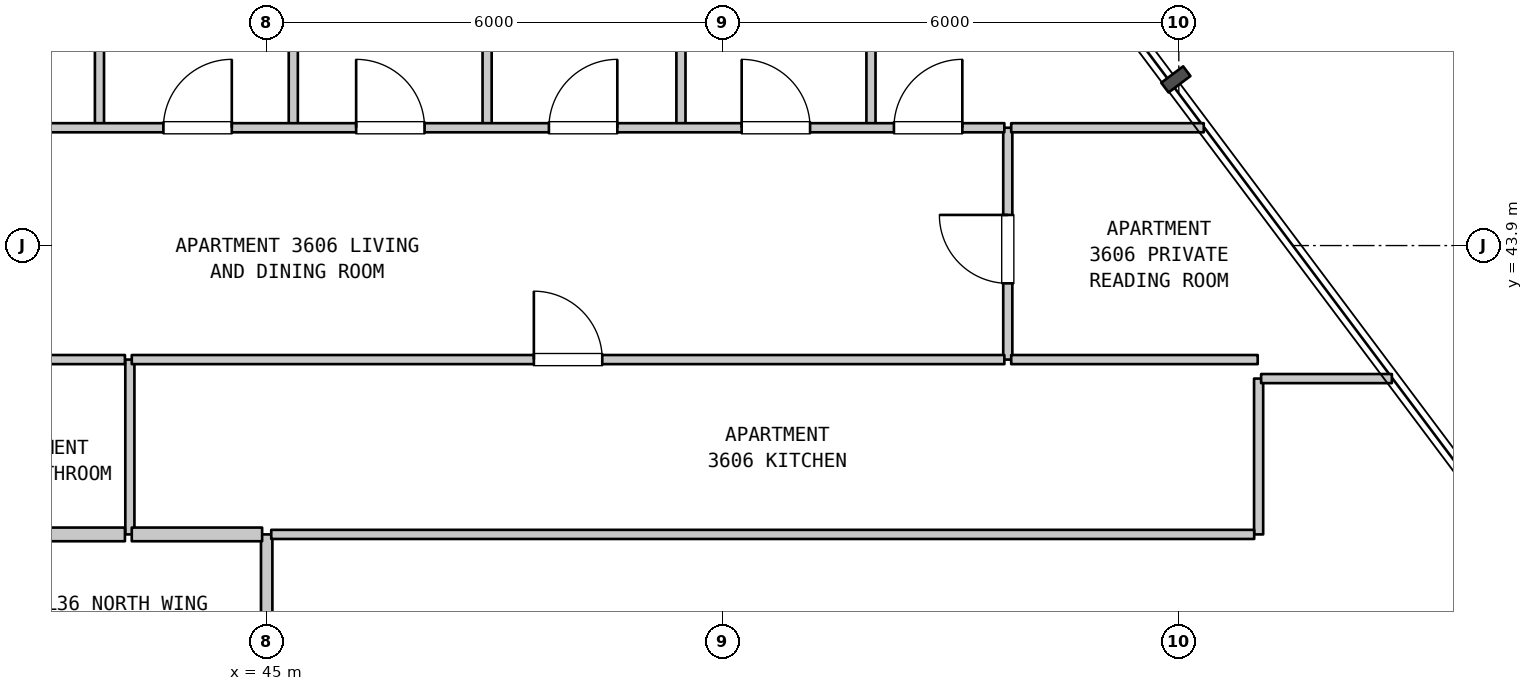
"""IFC4 building model, lengths in metres.
Left out: names, types, materials, properties, quantities, classifications, styles, units other than length and angle.
Written with IfcOpenShell. Run it as: python <this file> out.ifc"""

import sys

from ifc_helpers import new_model, si_unit, direction, frame, frame_2d, origin, place, context, subcontext, project, spatial, rectangle, extrude, element, fill, save


model = new_model("IFC4")
c1 = context("Model", 3, precision=1e-05, world=origin(), true_north=direction((0.0, 1.0)))
c2 = subcontext(c1, "Body", "Model", "MODEL_VIEW")
j1 = project(units=[si_unit("LENGTHUNIT", "METRE"), si_unit("PLANEANGLEUNIT", "RADIAN")], contexts=[c1])
p1 = place(None, origin())
s1 = spatial("IfcSite", under=j1, at=p1, CompositionType="ELEMENT")
p2 = place(p1, origin())
s2 = spatial("IfcBuilding", under=s1, at=p2, CompositionType="ELEMENT")
p3 = place(p2, frame((0.0, 0.0, 148.3)))
s3 = spatial("IfcBuildingStorey", under=s2, at=p3, CompositionType="ELEMENT", Elevation=148.3)
p4 = place(p3, frame((42.8, 45.45, 0.0), z_axis=(0.0, 0.0, 1.0), x_axis=(0.0, 1.0, 0.0)))
e1 = element("IfcWall", 1, at=p4, inside=s3, PredefinedType="PARTITIONING", context=c2, shape_type="SweptSolid", body=[
    extrude(rectangle(XDim=8.44, YDim=0.12, at=frame_2d((4.22, 0.0))), origin(), (0.0, 0.0, 1.0), 3.385),
])
p5 = place(p3, frame((43.2, 40.1, 0.0), z_axis=(0.0, 0.0, 1.0), x_axis=(0.0, 1.0, 0.0)))
e2 = element("IfcWall", 2, at=p5, inside=s3, PredefinedType="PARTITIONING", context=c2, shape_type="SweptSolid", body=[
    extrude(rectangle(XDim=2.3, YDim=0.12, at=frame_2d((1.15, 0.0))), origin(), (0.0, 0.0, 1.0), 3.385),
])
p6 = place(p3, frame((45.0, 37.9, 0.0), z_axis=(0.0, 0.0, 1.0), x_axis=(0.0, 1.0, 0.0)))
e3 = element("IfcWall", 3, at=p6, inside=s3, PredefinedType="STANDARD", context=c2, shape_type="SweptSolid", body=[
    extrude(rectangle(XDim=2.2, YDim=0.15, at=frame_2d((1.1, 0.0))), origin(), (0.0, 0.0, 1.0), 3.385),
])
for number, where, z_axis, x_axis in (
    (4, (45.35, 45.45, 0.0), (0.0, 0.0, 1.0), (0.0, 1.0, 0.0)),
    (5, (47.9, 45.45, 0.0), (0.0, 0.0, 1.0), (0.0, 1.0, 0.0)),
):
    element("IfcWall", number, at=place(p3, frame(where, z_axis=z_axis, x_axis=x_axis)), inside=s3, PredefinedType="PARTITIONING", context=c2, shape_type="SweptSolid", body=[
        extrude(rectangle(XDim=8.44, YDim=0.12, at=frame_2d((4.22, 0.0))), origin(), (0.0, 0.0, 1.0), 3.385),
    ])
p7 = place(p3, frame((50.45, 45.45, 0.0), z_axis=(0.0, 0.0, 1.0), x_axis=(0.0, 1.0, 0.0)))
e6 = element("IfcWall", 6, at=p7, inside=s3, PredefinedType="PARTITIONING", context=c2, shape_type="SweptSolid", body=[
    extrude(rectangle(XDim=8.215, YDim=0.12, at=frame_2d((4.107, 0.0))), origin(), (0.0, 0.0, 1.0), 3.385),
])
p8 = place(p3, frame((52.95, 45.45, 0.0), z_axis=(0.0, 0.0, 1.0), x_axis=(0.0, 1.0, 0.0)))
e7 = element("IfcWall", 7, at=p8, inside=s3, PredefinedType="PARTITIONING", context=c2, shape_type="SweptSolid", body=[
    extrude(rectangle(XDim=5.84, YDim=0.12, at=frame_2d((2.92, 0.0))), origin(), (0.0, 0.0, 1.0), 3.385),
])
p9 = place(p3, frame((54.75, 42.4, 0.0), z_axis=(0.0, 0.0, 1.0), x_axis=(0.0, 1.0, 0.0)))
e8 = element("IfcWall", 8, at=p9, inside=s3, PredefinedType="PARTITIONING", context=c2, shape_type="SweptSolid", body=[
    extrude(rectangle(XDim=3.05, YDim=0.12, at=frame_2d((1.525, 0.0))), origin(), (0.0, 0.0, 1.0), 3.385),
])
p10 = place(p9, frame((1.003, 0.0, 0.0)))
e9 = element("IfcOpeningElement", 9, at=p10, cuts=e8, PredefinedType="OPENING", context=c2, shape_type="SweptSolid", body=[
    extrude(rectangle(XDim=0.9, YDim=2.15, at=frame_2d((0.45, 1.075))), frame((0.0, 0.07, 0.0), z_axis=(0.0, -1.0, 0.0), x_axis=(1.0, 0.0, 0.0)), (0.0, 0.0, 1.0), 0.14),
])
p11 = place(p3, frame((58.05, 40.1, 0.0), z_axis=(0.0, 0.0, 1.0), x_axis=(0.0, 1.0, 0.0)))
e10 = element("IfcWall", 10, at=p11, inside=s3, PredefinedType="PARTITIONING", context=c2, shape_type="SweptSolid", body=[
    extrude(rectangle(XDim=2.05, YDim=0.12, at=frame_2d((1.025, 0.0))), origin(), (0.0, 0.0, 1.0), 3.385),
])
p12 = place(p3, frame((38.99, 40.1, 0.0), z_axis=(0.0, 0.0, 1.0), x_axis=(1.0, 0.0, 0.0)))
e11 = element("IfcWall", 11, at=p12, inside=s3, PredefinedType="STANDARD", context=c2, shape_type="SweptSolid", body=[
    extrude(rectangle(XDim=4.145, YDim=0.18, at=frame_2d((2.073, 0.0))), origin(), (0.0, 0.0, 1.0), 3.385),
])
p13 = place(p3, frame((43.225, 40.1, 0.0), z_axis=(0.0, 0.0, 1.0), x_axis=(1.0, 0.0, 0.0)))
e12 = element("IfcWall", 12, at=p13, inside=s3, PredefinedType="STANDARD", context=c2, shape_type="SweptSolid", body=[
    extrude(rectangle(XDim=1.715, YDim=0.18, at=frame_2d((0.857, 0.0))), origin(), (0.0, 0.0, 1.0), 3.385),
])
p14 = place(p3, frame((45.06, 40.1, 0.0), z_axis=(0.0, 0.0, 1.0), x_axis=(1.0, 0.0, 0.0)))
e13 = element("IfcWall", 13, at=p14, inside=s3, PredefinedType="PARTITIONING", context=c2, shape_type="SweptSolid", body=[
    extrude(rectangle(XDim=12.932, YDim=0.12, at=frame_2d((6.466, 0.0))), origin(), (0.0, 0.0, 1.0), 3.385),
])
p15 = place(p3, frame((58.083, 42.15, 0.0), z_axis=(0.0, 0.0, 1.0), x_axis=(1.0, 0.0, 0.0)))
e14 = element("IfcWall", 14, at=p15, inside=s3, PredefinedType="PARTITIONING", context=c2, shape_type="SweptSolid", body=[
    extrude(rectangle(XDim=1.72, YDim=0.12, at=frame_2d((0.86, 0.0))), origin(), (0.0, 0.0, 1.0), 3.385),
])
p16 = place(p3, frame((38.99, 42.4, 0.0), z_axis=(0.0, 0.0, 1.0), x_axis=(1.0, 0.0, 0.0)))
e15 = element("IfcWall", 15, at=p16, inside=s3, PredefinedType="PARTITIONING", context=c2, shape_type="SweptSolid", body=[
    extrude(rectangle(XDim=4.145, YDim=0.12, at=frame_2d((2.073, 0.0))), origin(), (0.0, 0.0, 1.0), 3.385),
])
p17 = place(p16, frame((1.59, 0.0, 0.0)))
e16 = element("IfcOpeningElement", 16, at=p17, cuts=e15, PredefinedType="OPENING", context=c2, shape_type="SweptSolid", body=[
    extrude(rectangle(XDim=0.9, YDim=2.1, at=frame_2d((0.45, 1.05))), frame((0.0, 0.07, 0.0), z_axis=(0.0, -1.0, 0.0), x_axis=(1.0, 0.0, 0.0)), (0.0, 0.0, 1.0), 0.14),
])
p18 = place(p3, frame((43.225, 42.4, 0.0), z_axis=(0.0, 0.0, 1.0), x_axis=(1.0, 0.0, 0.0)))
e17 = element("IfcWall", 17, at=p18, inside=s3, PredefinedType="PARTITIONING", context=c2, shape_type="SweptSolid", body=[
    extrude(rectangle(XDim=11.48, YDim=0.12, at=frame_2d((5.74, 0.0))), origin(), (0.0, 0.0, 1.0), 3.385),
])
p19 = place(p18, frame((5.29, 0.0, 0.0)))
e18 = element("IfcOpeningElement", 18, at=p19, cuts=e17, PredefinedType="OPENING", context=c2, shape_type="SweptSolid", body=[
    extrude(rectangle(XDim=0.9, YDim=2.15, at=frame_2d((0.45, 1.075))), frame((0.0, 0.07, 0.0), z_axis=(0.0, -1.0, 0.0), x_axis=(1.0, 0.0, 0.0)), (0.0, 0.0, 1.0), 0.14),
])
p20 = place(p3, frame((54.795, 42.4, 0.0), z_axis=(0.0, 0.0, 1.0), x_axis=(1.0, 0.0, 0.0)))
e19 = element("IfcWall", 19, at=p20, inside=s3, PredefinedType="PARTITIONING", context=c2, shape_type="SweptSolid", body=[
    extrude(rectangle(XDim=3.243, YDim=0.12, at=frame_2d((1.622, 0.0))), origin(), (0.0, 0.0, 1.0), 3.385),
])
p21 = place(p3, frame((32.725, 45.45, 0.0), z_axis=(0.0, 0.0, 1.0), x_axis=(1.0, 0.0, 0.0)))
e20 = element("IfcWall", 20, at=p21, inside=s3, PredefinedType="PARTITIONING", context=c2, shape_type="SweptSolid", body=[
    extrude(rectangle(XDim=21.98, YDim=0.12, at=frame_2d((10.99, 0.0))), origin(), (0.0, 0.0, 1.0), 3.385),
])
p22 = place(p21, frame((0.872, 0.0, 0.0)))
e21 = element("IfcOpeningElement", 21, at=p22, cuts=e20, PredefinedType="OPENING", context=c2, shape_type="SweptSolid", body=[
    extrude(rectangle(XDim=0.9, YDim=2.15, at=frame_2d((0.45, 1.075))), frame((0.0, 0.07, 0.0), z_axis=(0.0, -1.0, 0.0), x_axis=(1.0, 0.0, 0.0)), (0.0, 0.0, 1.0), 0.14),
])
p23 = place(p21, frame((3.309, 0.0, 0.0)))
e22 = element("IfcOpeningElement", 22, at=p23, cuts=e20, PredefinedType="OPENING", context=c2, shape_type="SweptSolid", body=[
    extrude(rectangle(XDim=0.9, YDim=2.15, at=frame_2d((0.45, 1.075))), frame((0.0, 0.07, 0.0), z_axis=(0.0, -1.0, 0.0), x_axis=(1.0, 0.0, 0.0)), (0.0, 0.0, 1.0), 0.14),
])
p24 = place(p21, frame((5.845, 0.0, 0.0)))
e23 = element("IfcOpeningElement", 23, at=p24, cuts=e20, PredefinedType="OPENING", context=c2, shape_type="SweptSolid", body=[
    extrude(rectangle(XDim=0.9, YDim=2.15, at=frame_2d((0.45, 1.075))), frame((0.0, 0.07, 0.0), z_axis=(0.0, -1.0, 0.0), x_axis=(1.0, 0.0, 0.0)), (0.0, 0.0, 1.0), 0.14),
])
p25 = place(p21, frame((8.38, 0.0, 0.0)))
e24 = element("IfcOpeningElement", 24, at=p25, cuts=e20, PredefinedType="OPENING", context=c2, shape_type="SweptSolid", body=[
    extrude(rectangle(XDim=0.9, YDim=2.15, at=frame_2d((0.45, 1.075))), frame((0.0, 0.07, 0.0), z_axis=(0.0, -1.0, 0.0), x_axis=(1.0, 0.0, 0.0)), (0.0, 0.0, 1.0), 0.14),
])
p26 = place(p21, frame((10.916, 0.0, 0.0)))
e25 = element("IfcOpeningElement", 25, at=p26, cuts=e20, PredefinedType="OPENING", context=c2, shape_type="SweptSolid", body=[
    extrude(rectangle(XDim=0.9, YDim=2.15, at=frame_2d((0.45, 1.075))), frame((0.0, 0.07, 0.0), z_axis=(0.0, -1.0, 0.0), x_axis=(1.0, 0.0, 0.0)), (0.0, 0.0, 1.0), 0.14),
])
p27 = place(p21, frame((13.452, 0.0, 0.0)))
e26 = element("IfcOpeningElement", 26, at=p27, cuts=e20, PredefinedType="OPENING", context=c2, shape_type="SweptSolid", body=[
    extrude(rectangle(XDim=0.9, YDim=2.15, at=frame_2d((0.45, 1.075))), frame((0.0, 0.07, 0.0), z_axis=(0.0, -1.0, 0.0), x_axis=(1.0, 0.0, 0.0)), (0.0, 0.0, 1.0), 0.14),
])
p28 = place(p21, frame((15.988, 0.0, 0.0)))
e27 = element("IfcOpeningElement", 27, at=p28, cuts=e20, PredefinedType="OPENING", context=c2, shape_type="SweptSolid", body=[
    extrude(rectangle(XDim=0.9, YDim=2.15, at=frame_2d((0.45, 1.075))), frame((0.0, 0.07, 0.0), z_axis=(0.0, -1.0, 0.0), x_axis=(1.0, 0.0, 0.0)), (0.0, 0.0, 1.0), 0.14),
])
p29 = place(p21, frame((18.524, 0.0, 0.0)))
e28 = element("IfcOpeningElement", 28, at=p29, cuts=e20, PredefinedType="OPENING", context=c2, shape_type="SweptSolid", body=[
    extrude(rectangle(XDim=0.9, YDim=2.15, at=frame_2d((0.45, 1.075))), frame((0.0, 0.07, 0.0), z_axis=(0.0, -1.0, 0.0), x_axis=(1.0, 0.0, 0.0)), (0.0, 0.0, 1.0), 0.14),
])
p30 = place(p21, frame((20.527, 0.0, 0.0)))
e29 = element("IfcOpeningElement", 29, at=p30, cuts=e20, PredefinedType="OPENING", context=c2, shape_type="SweptSolid", body=[
    extrude(rectangle(XDim=0.9, YDim=2.15, at=frame_2d((0.45, 1.075))), frame((0.0, 0.07, 0.0), z_axis=(0.0, -1.0, 0.0), x_axis=(1.0, 0.0, 0.0)), (0.0, 0.0, 1.0), 0.14),
])
p31 = place(p3, frame((54.795, 45.45, 0.0), z_axis=(0.0, 0.0, 1.0), x_axis=(1.0, 0.0, 0.0)))
e30 = element("IfcWall", 30, at=p31, inside=s3, PredefinedType="PARTITIONING", context=c2, shape_type="SweptSolid", body=[
    extrude(rectangle(XDim=2.533, YDim=0.12, at=frame_2d((1.267, 0.0))), origin(), (0.0, 0.0, 1.0), 3.385),
])
p32 = place(p10, origin())
e31 = element("IfcDoor", 31, at=p32, inside=s3, OperationType="SINGLE_SWING_RIGHT", PredefinedType="DOOR", context=c2, shape_type="SweptSolid", body=[
    extrude(rectangle(XDim=0.9, YDim=2.15, at=frame_2d((0.45, 1.075))), frame((0.0, 0.025, 0.0), z_axis=(0.0, -1.0, 0.0), x_axis=(1.0, 0.0, 0.0)), (0.0, 0.0, 1.0), 0.05),
])
fill(e9, e31)
p33 = place(p19, origin())
e32 = element("IfcDoor", 32, at=p33, inside=s3, OperationType="SINGLE_SWING_LEFT", PredefinedType="DOOR", context=c2, shape_type="SweptSolid", body=[
    extrude(rectangle(XDim=0.9, YDim=2.15, at=frame_2d((0.45, 1.075))), frame((0.0, 0.025, 0.0), z_axis=(0.0, -1.0, 0.0), x_axis=(1.0, 0.0, 0.0)), (0.0, 0.0, 1.0), 0.05),
])
fill(e18, e32)
p34 = place(p26, origin())
e33 = element("IfcDoor", 33, at=p34, inside=s3, OperationType="SINGLE_SWING_RIGHT", PredefinedType="DOOR", context=c2, shape_type="SweptSolid", body=[
    extrude(rectangle(XDim=0.9, YDim=2.15, at=frame_2d((0.45, 1.075))), frame((0.0, 0.025, 0.0), z_axis=(0.0, -1.0, 0.0), x_axis=(1.0, 0.0, 0.0)), (0.0, 0.0, 1.0), 0.05),
])
fill(e25, e33)
p35 = place(p27, origin())
e34 = element("IfcDoor", 34, at=p35, inside=s3, OperationType="SINGLE_SWING_LEFT", PredefinedType="DOOR", context=c2, shape_type="SweptSolid", body=[
    extrude(rectangle(XDim=0.9, YDim=2.15, at=frame_2d((0.45, 1.075))), frame((0.0, 0.025, 0.0), z_axis=(0.0, -1.0, 0.0), x_axis=(1.0, 0.0, 0.0)), (0.0, 0.0, 1.0), 0.05),
])
fill(e26, e34)
p36 = place(p28, origin())
e35 = element("IfcDoor", 35, at=p36, inside=s3, OperationType="SINGLE_SWING_RIGHT", PredefinedType="DOOR", context=c2, shape_type="SweptSolid", body=[
    extrude(rectangle(XDim=0.9, YDim=2.15, at=frame_2d((0.45, 1.075))), frame((0.0, 0.025, 0.0), z_axis=(0.0, -1.0, 0.0), x_axis=(1.0, 0.0, 0.0)), (0.0, 0.0, 1.0), 0.05),
])
fill(e27, e35)
p37 = place(p29, origin())
e36 = element("IfcDoor", 36, at=p37, inside=s3, OperationType="SINGLE_SWING_LEFT", PredefinedType="DOOR", context=c2, shape_type="SweptSolid", body=[
    extrude(rectangle(XDim=0.9, YDim=2.15, at=frame_2d((0.45, 1.075))), frame((0.0, 0.025, 0.0), z_axis=(0.0, -1.0, 0.0), x_axis=(1.0, 0.0, 0.0)), (0.0, 0.0, 1.0), 0.05),
])
fill(e28, e36)
p38 = place(p30, origin())
e37 = element("IfcDoor", 37, at=p38, inside=s3, OperationType="SINGLE_SWING_RIGHT", PredefinedType="DOOR", context=c2, shape_type="SweptSolid", body=[
    extrude(rectangle(XDim=0.9, YDim=2.15, at=frame_2d((0.45, 1.075))), frame((0.0, 0.025, 0.0), z_axis=(0.0, -1.0, 0.0), x_axis=(1.0, 0.0, 0.0)), (0.0, 0.0, 1.0), 0.05),
])
fill(e29, e37)
save(model, sys.argv[1])
